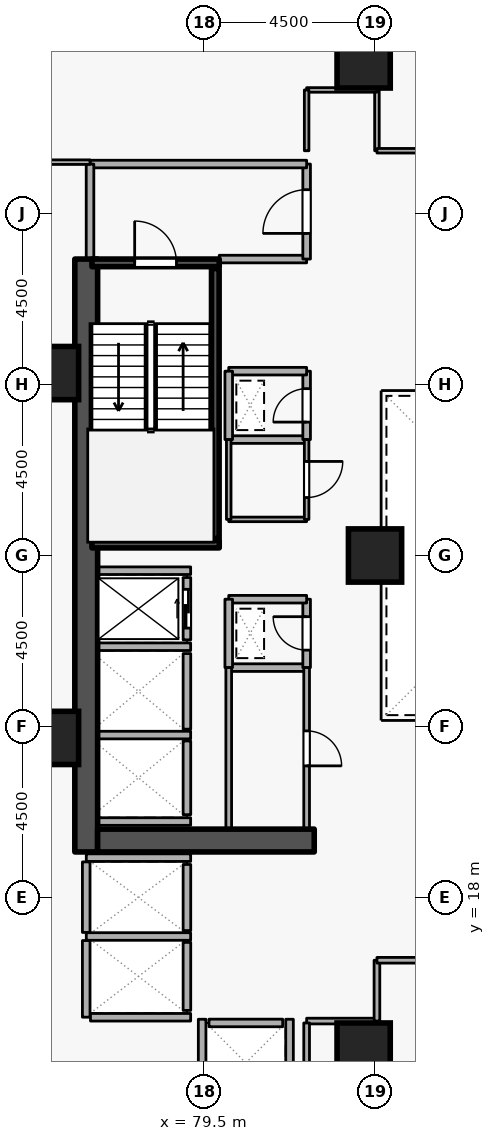
"""IFC4 building model, lengths in metres.
Left out: names, types, materials, properties, quantities, classifications, styles, units other than length and angle.
Written with IfcOpenShell. Run it as: python <this file> out.ifc"""

import sys

from ifc_helpers import new_model, si_unit, direction, frame, frame_2d, origin, origin_2d, place, context, subcontext, project, spatial, rectangle, extrude, element, fill, save


model = new_model("IFC4")
c1 = context("Model", 3, precision=1e-05, world=origin(), true_north=direction((0.0, 1.0)))
c2 = subcontext(c1, "Body", "Model", "MODEL_VIEW")
j1 = project(units=[si_unit("LENGTHUNIT", "METRE"), si_unit("PLANEANGLEUNIT", "RADIAN")], contexts=[c1])
p1 = place(None, origin())
s1 = spatial("IfcSite", under=j1, at=p1, CompositionType="ELEMENT")
p2 = place(p1, origin())
s2 = spatial("IfcBuilding", under=s1, at=p2, CompositionType="ELEMENT")
p3 = place(p2, frame((0.0, 0.0, 31.5)))
s3 = spatial("IfcBuildingStorey", under=s2, at=p3, CompositionType="ELEMENT", Elevation=31.5)
p4 = place(p3, frame((76.4, 19.2, 0.0), z_axis=(0.0, 0.0, 1.0), x_axis=(0.0, 1.0, 0.0)))
e1 = element("IfcWall", 1, at=p4, inside=s3, PredefinedType="SHEAR", context=c2, shape_type="SweptSolid", body=[
    extrude(rectangle(XDim=15.6, YDim=0.6, at=frame_2d((7.8, 0.0))), origin(), (0.0, 0.0, 1.0), 3.6),
])
p5 = place(p3, frame((76.7, 19.5, 0.0), z_axis=(0.0, 0.0, 1.0), x_axis=(1.0, 0.0, 0.0)))
e2 = element("IfcWall", 2, at=p5, inside=s3, PredefinedType="SHEAR", context=c2, shape_type="SweptSolid", body=[
    extrude(rectangle(XDim=5.7, YDim=0.6, at=frame_2d((2.85, 0.0))), origin(), (0.0, 0.0, 1.0), 3.6),
])
for number, where, z_axis, x_axis in (
    (3, (83.7, 14.0, 0.0), (0.0, 0.0, 1.0), (1.0, 0.0, 0.0)),
    (4, (83.7, 40.0, 0.0), (0.0, 0.0, 1.0), (1.0, 0.0, 0.0)),
    (5, (75.5, 22.2, 0.0), (0.0, 0.0, 1.0), (1.0, 0.0, 0.0)),
    (6, (75.5, 31.8, 0.0), (0.0, 0.0, 1.0), (1.0, 0.0, 0.0)),
    (7, (84.0, 27.0, 0.0), (0.0, 0.0, 1.0), (1.0, 0.0, 0.0)),
):
    element("IfcColumn", number, at=place(p3, frame(where, z_axis=z_axis, x_axis=x_axis)), inside=s3, PredefinedType="COLUMN", context=c2, shape_type="SweptSolid", body=[
        extrude(rectangle(XDim=1.4, YDim=1.4, at=origin_2d()), origin(), (0.0, 0.0, 1.0), 3.6),
    ])
p6 = place(p3, frame((79.05, 24.78, 0.0), z_axis=(0.0, 0.0, 1.0), x_axis=(0.0, 1.0, 0.0)))
e8 = element("IfcWall", 8, at=p6, inside=s3, PredefinedType="STANDARD", context=c2, shape_type="SweptSolid", body=[
    extrude(rectangle(XDim=1.64, YDim=0.2, at=frame_2d((0.82, 0.0))), origin(), (0.0, 0.0, 1.0), 3.34),
])
p7 = place(p6, frame((0.31, 0.0, 0.0)))
e9 = element("IfcOpeningElement", 9, at=p7, cuts=e8, PredefinedType="OPENING", context=c2, shape_type="SweptSolid", body=[
    extrude(rectangle(XDim=1.02, YDim=2.06, at=frame_2d((0.51, 1.03))), frame((0.0, 0.11, 0.0), z_axis=(0.0, -1.0, 0.0), x_axis=(1.0, 0.0, 0.0)), (0.0, 0.0, 1.0), 0.22),
])
p8 = place(p3, frame((79.05, 22.43, 0.0), z_axis=(0.0, 0.0, 1.0), x_axis=(0.0, 1.0, 0.0)))
e10 = element("IfcWall", 10, at=p8, inside=s3, PredefinedType="STANDARD", context=c2, shape_type="SweptSolid", body=[
    extrude(rectangle(XDim=1.99, YDim=0.2, at=frame_2d((0.995, 0.0))), origin(), (0.0, 0.0, 1.0), 3.34),
])
p9 = place(p3, frame((79.05, 20.18, 0.0), z_axis=(0.0, 0.0, 1.0), x_axis=(0.0, 1.0, 0.0)))
e11 = element("IfcWall", 11, at=p9, inside=s3, PredefinedType="STANDARD", context=c2, shape_type="SweptSolid", body=[
    extrude(rectangle(XDim=1.94, YDim=0.2, at=frame_2d((0.97, 0.0))), origin(), (0.0, 0.0, 1.0), 3.34),
])
p10 = place(p3, frame((79.05, 17.13, 0.0), z_axis=(0.0, 0.0, 1.0), x_axis=(0.0, 1.0, 0.0)))
e12 = element("IfcWall", 12, at=p10, inside=s3, PredefinedType="STANDARD", context=c2, shape_type="SweptSolid", body=[
    extrude(rectangle(XDim=1.74, YDim=0.2, at=frame_2d((0.87, 0.0))), origin(), (0.0, 0.0, 1.0), 3.34),
])
p11 = place(p3, frame((79.05, 15.03, 0.0), z_axis=(0.0, 0.0, 1.0), x_axis=(0.0, 1.0, 0.0)))
e13 = element("IfcWall", 13, at=p11, inside=s3, PredefinedType="STANDARD", context=c2, shape_type="SweptSolid", body=[
    extrude(rectangle(XDim=1.79, YDim=0.2, at=frame_2d((0.895, 0.0))), origin(), (0.0, 0.0, 1.0), 3.34),
])
p12 = place(p3, frame((79.63, 14.7, 0.0), z_axis=(0.0, 0.0, 1.0), x_axis=(1.0, 0.0, 0.0)))
e14 = element("IfcWall", 14, at=p12, inside=s3, PredefinedType="STANDARD", context=c2, shape_type="SweptSolid", body=[
    extrude(rectangle(XDim=1.94, YDim=0.2, at=frame_2d((0.97, 0.0))), origin(), (0.0, 0.0, 1.0), 3.34),
])
for number, where, z_axis, x_axis in (
    (15, (76.712, 26.6, 0.0), (0.0, 0.0, 1.0), (1.0, 0.0, 0.0)),
    (16, (76.712, 24.6, 0.0), (0.0, 0.0, 1.0), (1.0, 0.0, 0.0)),
    (17, (76.712, 22.275, 0.0), (0.0, 0.0, 1.0), (1.0, 0.0, 0.0)),
    (18, (76.712, 20.0, 0.0), (0.0, 0.0, 1.0), (1.0, 0.0, 0.0)),
):
    element("IfcWall", number, at=place(p3, frame(where, z_axis=z_axis, x_axis=x_axis)), inside=s3, PredefinedType="STANDARD", context=c2, shape_type="SweptSolid", body=[
        extrude(rectangle(XDim=2.436, YDim=0.2, at=frame_2d((1.218, 0.0))), origin(), (0.0, 0.0, 1.0), 3.34),
    ])
p13 = place(p3, frame((76.402, 19.05, 0.0), z_axis=(0.0, 0.0, 1.0), x_axis=(1.0, 0.0, 0.0)))
e19 = element("IfcWall", 19, at=p13, inside=s3, PredefinedType="STANDARD", context=c2, shape_type="SweptSolid", body=[
    extrude(rectangle(XDim=2.746, YDim=0.2, at=frame_2d((1.373, 0.0))), origin(), (0.0, 0.0, 1.0), 2.545),
])
p14 = place(p3, frame((76.402, 16.975, 0.0), z_axis=(0.0, 0.0, 1.0), x_axis=(1.0, 0.0, 0.0)))
e20 = element("IfcWall", 20, at=p14, inside=s3, PredefinedType="STANDARD", context=c2, shape_type="SweptSolid", body=[
    extrude(rectangle(XDim=2.746, YDim=0.2, at=frame_2d((1.373, 0.0))), origin(), (0.0, 0.0, 1.0), 3.34),
])
p15 = place(p3, frame((76.4, 14.852, 0.0), z_axis=(0.0, 0.0, 1.0), x_axis=(0.0, 1.0, 0.0)))
e21 = element("IfcWall", 21, at=p15, inside=s3, PredefinedType="STANDARD", context=c2, shape_type="SweptSolid", body=[
    extrude(rectangle(XDim=2.016, YDim=0.2, at=frame_2d((1.008, 0.0))), origin(), (0.0, 0.0, 1.0), 3.34),
])
p16 = place(p3, frame((76.4, 17.082, 0.0), z_axis=(0.0, 0.0, 1.0), x_axis=(0.0, 1.0, 0.0)))
e22 = element("IfcWall", 22, at=p16, inside=s3, PredefinedType="STANDARD", context=c2, shape_type="SweptSolid", body=[
    extrude(rectangle(XDim=1.856, YDim=0.2, at=frame_2d((0.928, 0.0))), origin(), (0.0, 0.0, 1.0), 3.34),
])
p17 = place(p3, frame((76.512, 14.85, 0.0), z_axis=(0.0, 0.0, 1.0), x_axis=(1.0, 0.0, 0.0)))
e23 = element("IfcWall", 23, at=p17, inside=s3, PredefinedType="STANDARD", context=c2, shape_type="SweptSolid", body=[
    extrude(rectangle(XDim=2.636, YDim=0.2, at=frame_2d((1.318, 0.0))), origin(), (0.0, 0.0, 1.0), 3.34),
])
for number, where, z_axis, x_axis in (
    (24, (81.75, 12.612, 0.0), (0.0, 0.0, 1.0), (0.0, 1.0, 0.0)),
    (25, (79.45, 12.612, 0.0), (0.0, 0.0, 1.0), (0.0, 1.0, 0.0)),
):
    element("IfcWall", number, at=place(p3, frame(where, z_axis=z_axis, x_axis=x_axis)), inside=s3, PredefinedType="STANDARD", context=c2, shape_type="SweptSolid", body=[
        extrude(rectangle(XDim=2.186, YDim=0.2, at=frame_2d((1.093, 0.0))), origin(), (0.0, 0.0, 1.0), 3.34),
    ])
p18 = place(p3, frame((76.55, 34.7, 0.0), z_axis=(0.0, 0.0, 1.0), x_axis=(1.0, 0.0, 0.0)))
e26 = element("IfcWall", 26, at=p18, inside=s3, PredefinedType="SHEAR", context=c2, shape_type="SweptSolid", body=[
    extrude(rectangle(XDim=3.35, YDim=0.2, at=frame_2d((1.675, 0.0))), origin(), (0.0, 0.0, 1.0), 3.6),
])
p19 = place(p18, frame((1.125, 0.0, 0.0)))
e27 = element("IfcOpeningElement", 27, at=p19, cuts=e26, PredefinedType="OPENING", context=c2, shape_type="SweptSolid", body=[
    extrude(rectangle(XDim=1.1, YDim=2.1, at=frame_2d((0.55, 1.05))), frame((0.0, 0.11, 0.0), z_axis=(0.0, -1.0, 0.0), x_axis=(1.0, 0.0, 0.0)), (0.0, 0.0, 1.0), 0.22),
])
p20 = place(p3, frame((79.9, 27.3, 0.0), z_axis=(0.0, 0.0, 1.0), x_axis=(-1.0, 0.0, 0.0)))
e28 = element("IfcWall", 28, at=p20, inside=s3, PredefinedType="SHEAR", context=c2, shape_type="SweptSolid", body=[
    extrude(rectangle(XDim=3.35, YDim=0.2, at=frame_2d((1.675, 0.0))), origin(), (0.0, 0.0, 1.0), 3.6),
])
p21 = place(p3, frame((79.797, 27.45, 0.0), z_axis=(0.0, 0.0, 1.0), x_axis=(0.0, 1.0, 0.0)))
e29 = element("IfcWall", 29, at=p21, inside=s3, PredefinedType="SHEAR", context=c2, shape_type="SweptSolid", body=[
    extrude(rectangle(XDim=7.1, YDim=0.2, at=frame_2d((3.55, 0.0))), origin(), (0.0, 0.0, 1.0), 3.6),
])
p22 = place(p3, frame((79.9, 34.8, 0.0), z_axis=(0.0, 0.0, 1.0), x_axis=(1.0, 0.0, 0.0)))
e30 = element("IfcWall", 30, at=p22, inside=s3, PredefinedType="STANDARD", context=c2, shape_type="SweptSolid", body=[
    extrude(rectangle(XDim=2.3, YDim=0.2, at=frame_2d((1.15, 0.0))), origin(), (0.0, 0.0, 1.0), 2.545),
])
p23 = place(p3, frame((82.2, 34.8, 0.0), z_axis=(0.0, 0.0, 1.0), x_axis=(0.0, 1.0, 0.0)))
e31 = element("IfcWall", 31, at=p23, inside=s3, PredefinedType="STANDARD", context=c2, shape_type="SweptSolid", body=[
    extrude(rectangle(XDim=2.5, YDim=0.2, at=frame_2d((1.25, 0.0))), origin(), (0.0, 0.0, 1.0), 3.34),
])
p24 = place(p23, frame((0.675, 0.0, 0.0)))
e32 = element("IfcOpeningElement", 32, at=p24, cuts=e31, PredefinedType="OPENING", context=c2, shape_type="SweptSolid", body=[
    extrude(rectangle(XDim=1.15, YDim=2.1, at=frame_2d((0.575, 1.05))), frame((0.0, 0.11, 0.0), z_axis=(0.0, -1.0, 0.0), x_axis=(1.0, 0.0, 0.0)), (0.0, 0.0, 1.0), 0.22),
])
p25 = place(p3, frame((82.2, 37.3, 0.0), z_axis=(0.0, 0.0, 1.0), x_axis=(-1.0, 0.0, 0.0)))
e33 = element("IfcWall", 33, at=p25, inside=s3, PredefinedType="STANDARD", context=c2, shape_type="SweptSolid", body=[
    extrude(rectangle(XDim=5.7, YDim=0.2, at=frame_2d((2.85, 0.0))), origin(), (0.0, 0.0, 1.0), 3.34),
])
p26 = place(p3, frame((76.5, 37.3, 0.0), z_axis=(0.0, 0.0, 1.0), x_axis=(0.0, -1.0, 0.0)))
e34 = element("IfcWall", 34, at=p26, inside=s3, PredefinedType="STANDARD", context=c2, shape_type="SweptSolid", body=[
    extrude(rectangle(XDim=2.5, YDim=0.2, at=frame_2d((1.25, 0.0))), origin(), (0.0, 0.0, 1.0), 3.34),
])
p27 = place(p3, frame((80.15, 24.05, 0.0), z_axis=(0.0, 0.0, 1.0), x_axis=(1.0, 0.0, 0.0)))
e35 = element("IfcWall", 35, at=p27, inside=s3, PredefinedType="STANDARD", context=c2, shape_type="SweptSolid", body=[
    extrude(rectangle(XDim=2.05, YDim=0.2, at=frame_2d((1.025, 0.0))), origin(), (0.0, 0.0, 1.0), 3.34),
])
p28 = place(p3, frame((82.2, 24.05, 0.0), z_axis=(0.0, 0.0, 1.0), x_axis=(0.0, 1.0, 0.0)))
e36 = element("IfcWall", 36, at=p28, inside=s3, PredefinedType="STANDARD", context=c2, shape_type="SweptSolid", body=[
    extrude(rectangle(XDim=1.8, YDim=0.2, at=frame_2d((0.9, 0.0))), origin(), (0.0, 0.0, 1.0), 3.34),
])
p29 = place(p28, frame((0.46, 0.0, 0.0)))
e37 = element("IfcOpeningElement", 37, at=p29, cuts=e36, PredefinedType="OPENING", context=c2, shape_type="SweptSolid", body=[
    extrude(rectangle(XDim=0.88, YDim=2.04, at=frame_2d((0.44, 1.02))), frame((0.0, 0.11, 0.0), z_axis=(0.0, -1.0, 0.0), x_axis=(1.0, 0.0, 0.0)), (0.0, 0.0, 1.0), 0.22),
])
p30 = place(p3, frame((82.2, 25.85, 0.0), z_axis=(0.0, 0.0, 1.0), x_axis=(-1.0, 0.0, 0.0)))
e38 = element("IfcWall", 38, at=p30, inside=s3, PredefinedType="STANDARD", context=c2, shape_type="SweptSolid", body=[
    extrude(rectangle(XDim=2.05, YDim=0.2, at=frame_2d((1.025, 0.0))), origin(), (0.0, 0.0, 1.0), 3.34),
])
p31 = place(p3, frame((80.15, 25.85, 0.0), z_axis=(0.0, 0.0, 1.0), x_axis=(0.0, -1.0, 0.0)))
e39 = element("IfcWall", 39, at=p31, inside=s3, PredefinedType="STANDARD", context=c2, shape_type="SweptSolid", body=[
    extrude(rectangle(XDim=1.8, YDim=0.2, at=frame_2d((0.9, 0.0))), origin(), (0.0, 0.0, 1.0), 3.34),
])
p32 = place(p3, frame((80.15, 30.05, 0.0), z_axis=(0.0, 0.0, 1.0), x_axis=(1.0, 0.0, 0.0)))
e40 = element("IfcWall", 40, at=p32, inside=s3, PredefinedType="STANDARD", context=c2, shape_type="SweptSolid", body=[
    extrude(rectangle(XDim=2.05, YDim=0.2, at=frame_2d((1.025, 0.0))), origin(), (0.0, 0.0, 1.0), 3.34),
])
p33 = place(p3, frame((82.2, 30.05, 0.0), z_axis=(0.0, 0.0, 1.0), x_axis=(0.0, 1.0, 0.0)))
e41 = element("IfcWall", 41, at=p33, inside=s3, PredefinedType="STANDARD", context=c2, shape_type="SweptSolid", body=[
    extrude(rectangle(XDim=1.8, YDim=0.2, at=frame_2d((0.9, 0.0))), origin(), (0.0, 0.0, 1.0), 3.34),
])
p34 = place(p33, frame((0.46, 0.0, 0.0)))
e42 = element("IfcOpeningElement", 42, at=p34, cuts=e41, PredefinedType="OPENING", context=c2, shape_type="SweptSolid", body=[
    extrude(rectangle(XDim=0.88, YDim=2.04, at=frame_2d((0.44, 1.02))), frame((0.0, 0.11, 0.0), z_axis=(0.0, -1.0, 0.0), x_axis=(1.0, 0.0, 0.0)), (0.0, 0.0, 1.0), 0.22),
])
p35 = place(p3, frame((82.2, 31.85, 0.0), z_axis=(0.0, 0.0, 1.0), x_axis=(-1.0, 0.0, 0.0)))
e43 = element("IfcWall", 43, at=p35, inside=s3, PredefinedType="STANDARD", context=c2, shape_type="SweptSolid", body=[
    extrude(rectangle(XDim=2.05, YDim=0.2, at=frame_2d((1.025, 0.0))), origin(), (0.0, 0.0, 1.0), 3.34),
])
p36 = place(p3, frame((80.15, 31.85, 0.0), z_axis=(0.0, 0.0, 1.0), x_axis=(0.0, -1.0, 0.0)))
e44 = element("IfcWall", 44, at=p36, inside=s3, PredefinedType="STANDARD", context=c2, shape_type="SweptSolid", body=[
    extrude(rectangle(XDim=1.8, YDim=0.2, at=frame_2d((0.9, 0.0))), origin(), (0.0, 0.0, 1.0), 3.34),
])
p37 = place(p3, frame((80.15, 19.8, 0.0), z_axis=(0.0, 0.0, 1.0), x_axis=(0.0, 1.0, 0.0)))
e45 = element("IfcWall", 45, at=p37, inside=s3, PredefinedType="PARTITIONING", context=c2, shape_type="SweptSolid", body=[
    extrude(rectangle(XDim=4.25, YDim=0.15, at=frame_2d((2.125, 0.0))), origin(), (0.0, 0.0, 1.0), 3.34),
])
p38 = place(p3, frame((82.2, 24.05, 0.0), z_axis=(0.0, 0.0, 1.0), x_axis=(0.0, -1.0, 0.0)))
e46 = element("IfcWall", 46, at=p38, inside=s3, PredefinedType="PARTITIONING", context=c2, shape_type="SweptSolid", body=[
    extrude(rectangle(XDim=4.25, YDim=0.15, at=frame_2d((2.125, 0.0))), origin(), (0.0, 0.0, 1.0), 3.34),
])
p39 = place(p38, frame((1.665, 0.0, 0.0)))
e47 = element("IfcOpeningElement", 47, at=p39, cuts=e46, PredefinedType="OPENING", context=c2, shape_type="SweptSolid", body=[
    extrude(rectangle(XDim=0.92, YDim=2.08, at=frame_2d((0.46, 1.04))), frame((0.0, 0.085, 0.0), z_axis=(0.0, -1.0, 0.0), x_axis=(1.0, 0.0, 0.0)), (0.0, 0.0, 1.0), 0.17),
])
p40 = place(p3, frame((82.2, 27.95, 0.0), z_axis=(0.0, 0.0, 1.0), x_axis=(-1.0, 0.0, 0.0)))
e48 = element("IfcWall", 48, at=p40, inside=s3, PredefinedType="PARTITIONING", context=c2, shape_type="SweptSolid", body=[
    extrude(rectangle(XDim=2.05, YDim=0.12, at=frame_2d((1.025, 0.0))), origin(), (0.0, 0.0, 1.0), 3.34),
])
p41 = place(p3, frame((80.15, 27.95, 0.0), z_axis=(0.0, 0.0, 1.0), x_axis=(0.0, 1.0, 0.0)))
e49 = element("IfcWall", 49, at=p41, inside=s3, PredefinedType="PARTITIONING", context=c2, shape_type="SweptSolid", body=[
    extrude(rectangle(XDim=2.1, YDim=0.12, at=frame_2d((1.05, 0.0))), origin(), (0.0, 0.0, 1.0), 3.34),
])
p42 = place(p3, frame((82.2, 30.05, 0.0), z_axis=(0.0, 0.0, 1.0), x_axis=(0.0, -1.0, 0.0)))
e50 = element("IfcWall", 50, at=p42, inside=s3, PredefinedType="PARTITIONING", context=c2, shape_type="SweptSolid", body=[
    extrude(rectangle(XDim=2.1, YDim=0.12, at=frame_2d((1.05, 0.0))), origin(), (0.0, 0.0, 1.0), 3.34),
])
p43 = place(p42, frame((0.575, 0.0, 0.0)))
e51 = element("IfcOpeningElement", 51, at=p43, cuts=e50, PredefinedType="OPENING", context=c2, shape_type="SweptSolid", body=[
    extrude(rectangle(XDim=0.95, YDim=2.1, at=frame_2d((0.475, 1.05))), frame((0.0, 0.07, 0.0), z_axis=(0.0, -1.0, 0.0), x_axis=(1.0, 0.0, 0.0)), (0.0, 0.0, 1.0), 0.14),
])
p44 = place(p3, frame((82.2, 14.75, 0.0), z_axis=(0.0, 0.0, 1.0), x_axis=(1.0, 0.0, 0.0)))
e52 = element("IfcWall", 52, at=p44, inside=s3, PredefinedType="PARTITIONING", context=c2, shape_type="SweptSolid", body=[
    extrude(rectangle(XDim=1.85, YDim=0.15, at=frame_2d((0.925, 0.0))), origin(), (0.0, 0.0, 1.0), 3.34),
])
p45 = place(p3, frame((84.05, 14.75, 0.0), z_axis=(0.0, 0.0, 1.0), x_axis=(0.0, 1.0, 0.0)))
e53 = element("IfcWall", 53, at=p45, inside=s3, PredefinedType="PARTITIONING", context=c2, shape_type="SweptSolid", body=[
    extrude(rectangle(XDim=1.6, YDim=0.15, at=frame_2d((0.8, 0.0))), origin(), (0.0, 0.0, 1.0), 3.34),
])
p46 = place(p3, frame((84.05, 16.35, 0.0), z_axis=(0.0, 0.0, 1.0), x_axis=(1.0, 0.0, 0.0)))
e54 = element("IfcWall", 54, at=p46, inside=s3, PredefinedType="PARTITIONING", context=c2, shape_type="SweptSolid", body=[
    extrude(rectangle(XDim=4.45, YDim=0.15, at=frame_2d((2.225, 0.0))), origin(), (0.0, 0.0, 1.0), 3.34),
])
p47 = place(p46, frame((1.575, 0.0, 0.0)))
e55 = element("IfcOpeningElement", 55, at=p47, cuts=e54, PredefinedType="OPENING", context=c2, shape_type="SweptSolid", body=[
    extrude(rectangle(XDim=1.3, YDim=2.12, at=frame_2d((0.65, 1.06))), frame((0.0, 0.085, 0.0), z_axis=(0.0, -1.0, 0.0), x_axis=(1.0, 0.0, 0.0)), (0.0, 0.0, 1.0), 0.17),
])
p48 = place(p3, frame((82.2, 12.4, 0.0), z_axis=(0.0, 0.0, 1.0), x_axis=(0.0, 1.0, 0.0)))
e56 = element("IfcWall", 56, at=p48, inside=s3, PredefinedType="PARTITIONING", context=c2, shape_type="SweptSolid", body=[
    extrude(rectangle(XDim=2.3, YDim=0.15, at=frame_2d((1.15, 0.0))), origin(), (0.0, 0.0, 1.0), 3.34),
])
p49 = place(p3, frame((84.05, 37.65, 0.0), z_axis=(0.0, 0.0, 1.0), x_axis=(0.0, 1.0, 0.0)))
e57 = element("IfcWall", 57, at=p49, inside=s3, PredefinedType="PARTITIONING", context=c2, shape_type="SweptSolid", body=[
    extrude(rectangle(XDim=1.6, YDim=0.12, at=frame_2d((0.8, 0.0))), origin(), (0.0, 0.0, 1.0), 3.34),
])
p50 = place(p3, frame((84.05, 39.25, 0.0), z_axis=(0.0, 0.0, 1.0), x_axis=(-1.0, 0.0, 0.0)))
e58 = element("IfcWall", 58, at=p50, inside=s3, PredefinedType="PARTITIONING", context=c2, shape_type="SweptSolid", body=[
    extrude(rectangle(XDim=1.85, YDim=0.12, at=frame_2d((0.925, 0.0))), origin(), (0.0, 0.0, 1.0), 3.34),
])
p51 = place(p3, frame((82.2, 39.25, 0.0), z_axis=(0.0, 0.0, 1.0), x_axis=(0.0, -1.0, 0.0)))
e59 = element("IfcWall", 59, at=p51, inside=s3, PredefinedType="PARTITIONING", context=c2, shape_type="SweptSolid", body=[
    extrude(rectangle(XDim=1.6, YDim=0.12, at=frame_2d((0.8, 0.0))), origin(), (0.0, 0.0, 1.0), 3.34),
])
p52 = place(p3, frame((76.5, 37.35, 0.0), z_axis=(0.0, 0.0, 1.0), x_axis=(-1.0, 0.0, 0.0)))
e60 = element("IfcWall", 60, at=p52, inside=s3, PredefinedType="PARTITIONING", context=c2, shape_type="SweptSolid", body=[
    extrude(rectangle(XDim=6.22, YDim=0.12, at=frame_2d((3.11, 0.0))), origin(), (0.0, 0.0, 1.0), 3.34),
])
p53 = place(p3, frame((70.28, 39.452, 0.0), z_axis=(0.0, 0.0, 1.0), x_axis=(0.707106781187, 0.707106781187, 0.0)))
e61 = element("IfcWall", 61, at=p53, inside=s3, PredefinedType="PARTITIONING", context=c2, shape_type="SweptSolid", body=[
    extrude(rectangle(XDim=8.156, YDim=0.12, at=frame_2d((4.078, 0.0))), origin(), (0.0, 0.0, 1.0), 3.34),
])
p54 = place(p3, frame((88.5, 37.65, 0.0), z_axis=(0.0, 0.0, 1.0), x_axis=(-1.0, 0.0, 0.0)))
e62 = element("IfcWall", 62, at=p54, inside=s3, PredefinedType="PARTITIONING", context=c2, shape_type="SweptSolid", body=[
    extrude(rectangle(XDim=4.45, YDim=0.12, at=frame_2d((2.225, 0.0))), origin(), (0.0, 0.0, 1.0), 3.34),
])
p55 = place(p54, frame((1.7, 0.0, 0.0)))
e63 = element("IfcOpeningElement", 63, at=p55, cuts=e62, PredefinedType="OPENING", context=c2, shape_type="SweptSolid", body=[
    extrude(rectangle(XDim=1.05, YDim=2.1, at=frame_2d((0.525, 1.05))), frame((0.0, 0.07, 0.0), z_axis=(0.0, -1.0, 0.0), x_axis=(1.0, 0.0, 0.0)), (0.0, 0.0, 1.0), 0.14),
])
p56 = place(p7, origin())
e64 = element("IfcDoor", 64, at=p56, inside=s3, OperationType="SLIDING_TO_LEFT", PredefinedType="DOOR", context=c2, shape_type="SweptSolid", body=[
    extrude(rectangle(XDim=1.02, YDim=2.06, at=frame_2d((0.51, 1.03))), frame((0.0, 0.025, 0.0), z_axis=(0.0, -1.0, 0.0), x_axis=(1.0, 0.0, 0.0)), (0.0, 0.0, 1.0), 0.05),
])
fill(e9, e64)
p57 = place(p19, origin())
e65 = element("IfcDoor", 65, at=p57, inside=s3, OperationType="SINGLE_SWING_LEFT", PredefinedType="DOOR", context=c2, shape_type="SweptSolid", body=[
    extrude(rectangle(XDim=1.1, YDim=2.1, at=frame_2d((0.55, 1.05))), frame((0.0, 0.025, 0.0), z_axis=(0.0, -1.0, 0.0), x_axis=(1.0, 0.0, 0.0)), (0.0, 0.0, 1.0), 0.05),
])
fill(e27, e65)
p58 = place(p24, origin())
e66 = element("IfcDoor", 66, at=p58, inside=s3, OperationType="SINGLE_SWING_LEFT", PredefinedType="DOOR", context=c2, shape_type="SweptSolid", body=[
    extrude(rectangle(XDim=1.15, YDim=2.1, at=frame_2d((0.575, 1.05))), frame((0.0, 0.025, 0.0), z_axis=(0.0, -1.0, 0.0), x_axis=(1.0, 0.0, 0.0)), (0.0, 0.0, 1.0), 0.05),
])
fill(e32, e66)
p59 = place(p29, origin())
e67 = element("IfcDoor", 67, at=p59, inside=s3, OperationType="SINGLE_SWING_RIGHT", PredefinedType="DOOR", context=c2, shape_type="SweptSolid", body=[
    extrude(rectangle(XDim=0.88, YDim=2.04, at=frame_2d((0.44, 1.02))), frame((0.0, 0.025, 0.0), z_axis=(0.0, -1.0, 0.0), x_axis=(1.0, 0.0, 0.0)), (0.0, 0.0, 1.0), 0.05),
])
fill(e37, e67)
p60 = place(p34, origin())
e68 = element("IfcDoor", 68, at=p60, inside=s3, OperationType="SINGLE_SWING_LEFT", PredefinedType="DOOR", context=c2, shape_type="SweptSolid", body=[
    extrude(rectangle(XDim=0.88, YDim=2.04, at=frame_2d((0.44, 1.02))), frame((0.0, 0.025, 0.0), z_axis=(0.0, -1.0, 0.0), x_axis=(1.0, 0.0, 0.0)), (0.0, 0.0, 1.0), 0.05),
])
fill(e42, e68)
p61 = place(p39, origin())
e69 = element("IfcDoor", 69, at=p61, inside=s3, OperationType="SINGLE_SWING_RIGHT", PredefinedType="DOOR", context=c2, shape_type="SweptSolid", body=[
    extrude(rectangle(XDim=0.92, YDim=2.08, at=frame_2d((0.46, 1.04))), frame((0.0, 0.025, 0.0), z_axis=(0.0, -1.0, 0.0), x_axis=(1.0, 0.0, 0.0)), (0.0, 0.0, 1.0), 0.05),
])
fill(e47, e69)
p62 = place(p43, origin())
e70 = element("IfcDoor", 70, at=p62, inside=s3, OperationType="SINGLE_SWING_LEFT", PredefinedType="DOOR", context=c2, shape_type="SweptSolid", body=[
    extrude(rectangle(XDim=0.95, YDim=2.1, at=frame_2d((0.475, 1.05))), frame((0.0, 0.025, 0.0), z_axis=(0.0, -1.0, 0.0), x_axis=(1.0, 0.0, 0.0)), (0.0, 0.0, 1.0), 0.05),
])
fill(e51, e70)
save(model, sys.argv[1])
